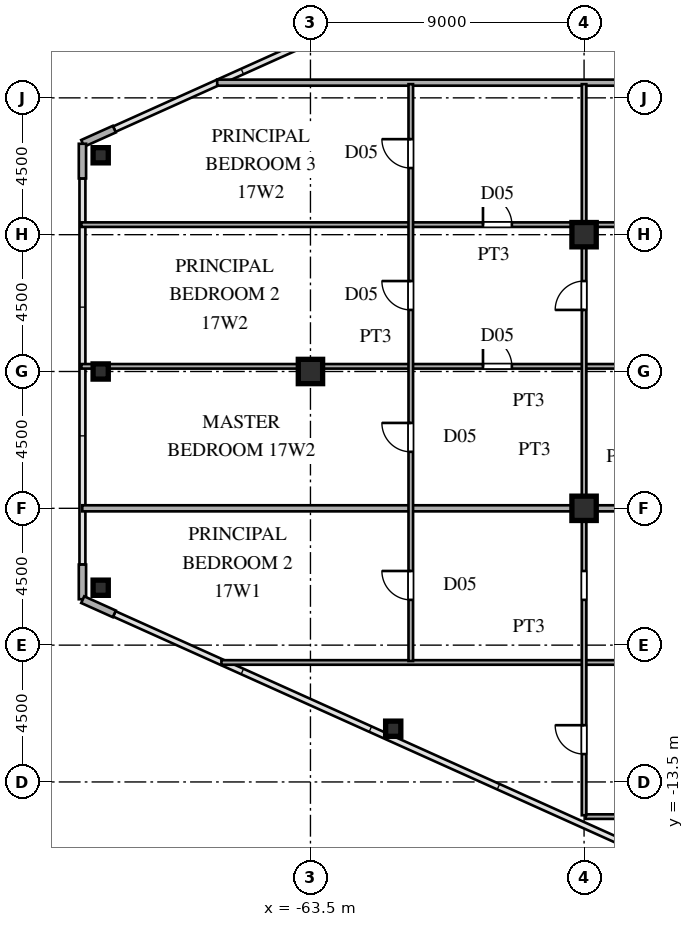
"""IFC4 building model, lengths in metres.
Left out: names, types, materials, properties, quantities, classifications, styles, units other than length and angle.
Written with IfcOpenShell. Run it as: python <this file> out.ifc"""

import sys

from ifc_helpers import new_model, si_unit, direction, frame, frame_2d, origin, origin_2d, place, context, subcontext, project, spatial, rectangle, hollow_rectangle, i_section, extrude, source, transform, mapped, element, fill, save


model = new_model("IFC4")
c1 = context("Model", 3, precision=1e-05, world=origin(), true_north=direction((0.0, 1.0)))
c2 = subcontext(c1, "Body", "Model", "MODEL_VIEW")
j1 = project(units=[si_unit("LENGTHUNIT", "METRE"), si_unit("PLANEANGLEUNIT", "RADIAN")], contexts=[c1])
p1 = place(None, origin())
s1 = spatial("IfcSite", under=j1, at=p1, CompositionType="ELEMENT")
p2 = place(p1, origin())
s2 = spatial("IfcBuilding", under=s1, at=p2, CompositionType="ELEMENT")
p3 = place(p2, frame((0.0, 0.0, 65.7)))
s3 = spatial("IfcBuildingStorey", under=s2, at=p3, CompositionType="ELEMENT", Elevation=65.7)
m1 = source(origin(), c2, "Body", "SweptSolid", [
    extrude(i_section(OverallWidth=0.8, OverallDepth=0.8, WebThickness=0.032, FlangeThickness=0.05, at=origin_2d()), origin(), (0.0, 0.0, 1.0), 3.6),
])
for number, where, z_axis, x_axis in (
    (1, (-54.5, -4.5, 0.0), (0.0, 0.0, 1.0), (1.0, 0.0, 0.0)),
    (2, (-54.5, 4.5, 0.0), (0.0, 0.0, 1.0), (1.0, 0.0, 0.0)),
    (3, (-63.5, 0.0, 0.0), (0.0, 0.0, 1.0), (1.0, 0.0, 0.0)),
):
    element("IfcColumn", number, at=place(p3, frame(where, z_axis=z_axis, x_axis=x_axis)), inside=s3, PredefinedType="COLUMN", context=c2, shape_type="MappedRepresentation", body=[
        mapped(m1, transform((0.0, 0.0, 0.0), scale=1.0)),
    ])
m2 = source(origin(), c2, "Body", "SweptSolid", [
    extrude(hollow_rectangle(XDim=0.5, YDim=0.5, WallThickness=0.02, at=origin_2d()), origin(), (0.0, 0.0, 1.0), 3.6),
])
for number, where, z_axis, x_axis in (
    (4, (-70.4, 7.112, 0.0), (0.0, 0.0, 1.0), (1.0, 0.0, 0.0)),
    (5, (-70.4, -7.112, 0.0), (0.0, 0.0, 1.0), (1.0, 0.0, 0.0)),
    (6, (-60.778, -11.749, 0.0), (0.0, 0.0, 1.0), (1.0, 0.0, 0.0)),
    (7, (-70.4, 0.0, 0.0), (0.0, 0.0, 1.0), (1.0, 0.0, 0.0)),
):
    element("IfcColumn", number, at=place(p3, frame(where, z_axis=z_axis, x_axis=x_axis)), inside=s3, PredefinedType="COLUMN", context=c2, shape_type="MappedRepresentation", body=[
        mapped(m2, transform((0.0, 0.0, 0.0), scale=1.0)),
    ])
for number, where, z_axis, x_axis in (
    (8, (-69.951, 7.972, 0.0), (0.0, 0.0, 1.0), (-0.912, -0.41, 0.0)),
    (9, (-71.0, 7.49, 0.0), (0.0, 0.0, 1.0), (0.0, -1.0, 0.0)),
    (10, (-71.0, -6.35, 0.0), (0.0, 0.0, 1.0), (0.0, -1.0, 0.0)),
    (11, (-70.991, -7.504, 0.0), (0.0, 0.0, 1.0), (0.912, -0.41, 0.0)),
):
    element("IfcWall", number, at=place(p3, frame(where, z_axis=z_axis, x_axis=x_axis)), inside=s3, PredefinedType="SOLIDWALL", context=c2, shape_type="SweptSolid", body=[
        extrude(rectangle(XDim=1.14, YDim=0.24, at=frame_2d((0.57, 0.0))), origin(), (0.0, 0.0, 1.0), 3.38),
    ])
p4 = place(p3, frame((-54.45, -14.64, 0.0), z_axis=(0.0, 0.0, 1.0), x_axis=(1.0, 0.0, 0.0)))
e12 = element("IfcWall", 12, at=p4, inside=s3, PredefinedType="PARTITIONING", context=c2, shape_type="SweptSolid", body=[
    extrude(rectangle(XDim=10.55, YDim=0.15, at=frame_2d((5.275, 0.0))), origin(), (0.0, 0.0, 1.0), 3.38),
])
p5 = place(p4, frame((4.8, 0.0, 0.0)))
e13 = element("IfcOpeningElement", 13, at=p5, cuts=e12, PredefinedType="OPENING", context=c2, shape_type="SweptSolid", body=[
    extrude(rectangle(XDim=0.95, YDim=2.15, at=frame_2d((0.475, 1.075))), frame((0.0, 0.085, 0.0), z_axis=(0.0, -1.0, 0.0), x_axis=(1.0, 0.0, 0.0)), (0.0, 0.0, 1.0), 0.17),
])
p6 = place(p3, frame((-66.429, -9.57, 0.0), z_axis=(0.0, 0.0, 1.0), x_axis=(1.0, 0.0, 0.0)))
e14 = element("IfcWall", 14, at=p6, inside=s3, PredefinedType="PARTITIONING", context=c2, shape_type="SweptSolid", body=[
    extrude(rectangle(XDim=22.529, YDim=0.15, at=frame_2d((11.265, 0.0))), origin(), (0.0, 0.0, 1.0), 3.38),
])
p7 = place(p6, frame((16.779, 0.0, 0.0)))
e15 = element("IfcOpeningElement", 15, at=p7, cuts=e14, PredefinedType="OPENING", context=c2, shape_type="SweptSolid", body=[
    extrude(rectangle(XDim=0.95, YDim=2.15, at=frame_2d((0.475, 1.075))), frame((0.0, 0.085, 0.0), z_axis=(0.0, -1.0, 0.0), x_axis=(1.0, 0.0, 0.0)), (0.0, 0.0, 1.0), 0.17),
])
p8 = place(p3, frame((-71.005, -4.5, 0.0), z_axis=(0.0, 0.0, 1.0), x_axis=(1.0, 0.0, 0.0)))
e16 = element("IfcWall", 16, at=p8, inside=s3, PredefinedType="PARTITIONING", context=c2, shape_type="SweptSolid", body=[
    extrude(rectangle(XDim=16.485, YDim=0.2, at=frame_2d((8.242, 0.0))), origin(), (0.0, 0.0, 1.0), 3.38),
])
p9 = place(p3, frame((-54.52, -4.5, 0.0), z_axis=(0.0, 0.0, 1.0), x_axis=(1.0, 0.0, 0.0)))
e17 = element("IfcWall", 17, at=p9, inside=s3, PredefinedType="PARTITIONING", context=c2, shape_type="SweptSolid", body=[
    extrude(rectangle(XDim=15.69, YDim=0.2, at=frame_2d((7.845, 0.0))), origin(), (0.0, 0.0, 1.0), 2.68),
])
p10 = place(p3, frame((-71.035, 0.17, 0.0), z_axis=(0.0, 0.0, 1.0), x_axis=(1.0, 0.0, 0.0)))
e18 = element("IfcWall", 18, at=p10, inside=s3, PredefinedType="PARTITIONING", context=c2, shape_type="SweptSolid", body=[
    extrude(rectangle(XDim=27.135, YDim=0.15, at=frame_2d((13.567, 0.0))), origin(), (0.0, 0.0, 1.0), 3.38),
])
p11 = place(p10, frame((21.385, 0.0, 0.0)))
e19 = element("IfcOpeningElement", 19, at=p11, cuts=e18, PredefinedType="OPENING", context=c2, shape_type="SweptSolid", body=[
    extrude(rectangle(XDim=0.95, YDim=2.15, at=frame_2d((0.475, 1.075))), frame((0.0, 0.085, 0.0), z_axis=(0.0, -1.0, 0.0), x_axis=(1.0, 0.0, 0.0)), (0.0, 0.0, 1.0), 0.17),
])
p12 = place(p10, frame((13.21, 0.0, 0.0)))
e20 = element("IfcOpeningElement", 20, at=p12, cuts=e18, PredefinedType="OPENING", context=c2, shape_type="SweptSolid", body=[
    extrude(rectangle(XDim=0.95, YDim=2.15, at=frame_2d((0.475, 1.075))), frame((0.0, 0.085, 0.0), z_axis=(0.0, -1.0, 0.0), x_axis=(1.0, 0.0, 0.0)), (0.0, 0.0, 1.0), 0.17),
])
p13 = place(p3, frame((-71.035, 4.83, 0.0), z_axis=(0.0, 0.0, 1.0), x_axis=(1.0, 0.0, 0.0)))
e21 = element("IfcWall", 21, at=p13, inside=s3, PredefinedType="PARTITIONING", context=c2, shape_type="SweptSolid", body=[
    extrude(rectangle(XDim=27.135, YDim=0.15, at=frame_2d((13.567, 0.0))), origin(), (0.0, 0.0, 1.0), 3.38),
])
p14 = place(p13, frame((21.385, 0.0, 0.0)))
e22 = element("IfcOpeningElement", 22, at=p14, cuts=e21, PredefinedType="OPENING", context=c2, shape_type="SweptSolid", body=[
    extrude(rectangle(XDim=0.95, YDim=2.15, at=frame_2d((0.475, 1.075))), frame((0.0, 0.085, 0.0), z_axis=(0.0, -1.0, 0.0), x_axis=(1.0, 0.0, 0.0)), (0.0, 0.0, 1.0), 0.17),
])
p15 = place(p13, frame((13.21, 0.0, 0.0)))
e23 = element("IfcOpeningElement", 23, at=p15, cuts=e21, PredefinedType="OPENING", context=c2, shape_type="SweptSolid", body=[
    extrude(rectangle(XDim=0.95, YDim=2.15, at=frame_2d((0.475, 1.075))), frame((0.0, 0.085, 0.0), z_axis=(0.0, -1.0, 0.0), x_axis=(1.0, 0.0, 0.0)), (0.0, 0.0, 1.0), 0.17),
])
p16 = place(p3, frame((-66.568, 9.5, 0.0), z_axis=(0.0, 0.0, 1.0), x_axis=(1.0, 0.0, 0.0)))
e24 = element("IfcWall", 24, at=p16, inside=s3, PredefinedType="PARTITIONING", context=c2, shape_type="SweptSolid", body=[
    extrude(rectangle(XDim=27.738, YDim=0.2, at=frame_2d((13.869, 0.0))), origin(), (0.0, 0.0, 1.0), 3.38),
])
p17 = place(p3, frame((-60.2, -9.522, 0.0), z_axis=(0.0, 0.0, 1.0), x_axis=(0.0, 1.0, 0.0)))
e25 = element("IfcWall", 25, at=p17, inside=s3, PredefinedType="PARTITIONING", context=c2, shape_type="SweptSolid", body=[
    extrude(rectangle(XDim=18.972, YDim=0.15, at=frame_2d((9.486, 0.0))), origin(), (0.0, 0.0, 1.0), 3.38),
])
p18 = place(p17, frame((2.011, 0.0, 0.0)))
e26 = element("IfcOpeningElement", 26, at=p18, cuts=e25, PredefinedType="OPENING", context=c2, shape_type="SweptSolid", body=[
    extrude(rectangle(XDim=0.95, YDim=2.15, at=frame_2d((0.475, 1.075))), frame((0.0, 0.085, 0.0), z_axis=(0.0, -1.0, 0.0), x_axis=(1.0, 0.0, 0.0)), (0.0, 0.0, 1.0), 0.17),
])
p19 = place(p17, frame((6.88, 0.0, 0.0)))
e27 = element("IfcOpeningElement", 27, at=p19, cuts=e25, PredefinedType="OPENING", context=c2, shape_type="SweptSolid", body=[
    extrude(rectangle(XDim=0.95, YDim=2.15, at=frame_2d((0.475, 1.075))), frame((0.0, 0.085, 0.0), z_axis=(0.0, -1.0, 0.0), x_axis=(1.0, 0.0, 0.0)), (0.0, 0.0, 1.0), 0.17),
])
p20 = place(p17, frame((11.547, 0.0, 0.0)))
e28 = element("IfcOpeningElement", 28, at=p20, cuts=e25, PredefinedType="OPENING", context=c2, shape_type="SweptSolid", body=[
    extrude(rectangle(XDim=0.95, YDim=2.15, at=frame_2d((0.475, 1.075))), frame((0.0, 0.085, 0.0), z_axis=(0.0, -1.0, 0.0), x_axis=(1.0, 0.0, 0.0)), (0.0, 0.0, 1.0), 0.17),
])
p21 = place(p17, frame((16.214, 0.0, 0.0)))
e29 = element("IfcOpeningElement", 29, at=p21, cuts=e25, PredefinedType="OPENING", context=c2, shape_type="SweptSolid", body=[
    extrude(rectangle(XDim=0.95, YDim=2.15, at=frame_2d((0.475, 1.075))), frame((0.0, 0.085, 0.0), z_axis=(0.0, -1.0, 0.0), x_axis=(1.0, 0.0, 0.0)), (0.0, 0.0, 1.0), 0.17),
])
p22 = place(p3, frame((-54.5, -14.595, 0.0), z_axis=(0.0, 0.0, 1.0), x_axis=(0.0, 1.0, 0.0)))
e30 = element("IfcWall", 30, at=p22, inside=s3, PredefinedType="PARTITIONING", context=c2, shape_type="SweptSolid", body=[
    extrude(rectangle(XDim=24.045, YDim=0.15, at=frame_2d((12.022, 0.0))), origin(), (0.0, 0.0, 1.0), 2.68),
])
p23 = place(p22, frame((2.011, 0.0, 0.0)))
e31 = element("IfcOpeningElement", 31, at=p23, cuts=e30, PredefinedType="OPENING", context=c2, shape_type="SweptSolid", body=[
    extrude(rectangle(XDim=0.95, YDim=2.15, at=frame_2d((0.475, 1.075))), frame((0.0, 0.085, 0.0), z_axis=(0.0, -1.0, 0.0), x_axis=(1.0, 0.0, 0.0)), (0.0, 0.0, 1.0), 0.17),
])
p24 = place(p22, frame((7.084, 0.0, 0.0)))
e32 = element("IfcOpeningElement", 32, at=p24, cuts=e30, PredefinedType="OPENING", context=c2, shape_type="SweptSolid", body=[
    extrude(rectangle(XDim=0.95, YDim=2.15, at=frame_2d((0.475, 1.075))), frame((0.0, 0.085, 0.0), z_axis=(0.0, -1.0, 0.0), x_axis=(1.0, 0.0, 0.0)), (0.0, 0.0, 1.0), 0.17),
])
p25 = place(p22, frame((16.62, 0.0, 0.0)))
e33 = element("IfcOpeningElement", 33, at=p25, cuts=e30, PredefinedType="OPENING", context=c2, shape_type="SweptSolid", body=[
    extrude(rectangle(XDim=0.95, YDim=2.15, at=frame_2d((0.475, 1.075))), frame((0.0, 0.085, 0.0), z_axis=(0.0, -1.0, 0.0), x_axis=(1.0, 0.0, 0.0)), (0.0, 0.0, 1.0), 0.17),
])
m3 = source(origin(), c2, "Body", "SweptSolid", [
    extrude(rectangle(XDim=0.95, YDim=2.15, at=frame_2d((0.475, 1.075))), frame((0.0, 0.025, 0.0), z_axis=(0.0, -1.0, 0.0), x_axis=(1.0, 0.0, 0.0)), (0.0, 0.0, 1.0), 0.05),
])
p26 = place(p12, origin())
e34 = element("IfcDoor", 34, at=p26, inside=s3, OperationType="SINGLE_SWING_LEFT", PredefinedType="DOOR", context=c2, shape_type="MappedRepresentation", body=[
    mapped(m3, transform((0.0, 0.0, 0.0), scale=1.0)),
])
fill(e20, e34)
p27 = place(p15, origin())
e35 = element("IfcDoor", 35, at=p27, inside=s3, OperationType="SINGLE_SWING_LEFT", PredefinedType="DOOR", context=c2, shape_type="MappedRepresentation", body=[
    mapped(m3, transform((0.0, 0.0, 0.0), scale=1.0)),
])
fill(e23, e35)
p28 = place(p18, origin())
e36 = element("IfcDoor", 36, at=p28, inside=s3, OperationType="SINGLE_SWING_RIGHT", PredefinedType="DOOR", context=c2, shape_type="MappedRepresentation", body=[
    mapped(m3, transform((0.0, 0.0, 0.0), scale=1.0)),
])
fill(e26, e36)
p29 = place(p19, origin())
e37 = element("IfcDoor", 37, at=p29, inside=s3, OperationType="SINGLE_SWING_RIGHT", PredefinedType="DOOR", context=c2, shape_type="MappedRepresentation", body=[
    mapped(m3, transform((0.0, 0.0, 0.0), scale=1.0)),
])
fill(e27, e37)
p30 = place(p20, origin())
e38 = element("IfcDoor", 38, at=p30, inside=s3, OperationType="SINGLE_SWING_RIGHT", PredefinedType="DOOR", context=c2, shape_type="MappedRepresentation", body=[
    mapped(m3, transform((0.0, 0.0, 0.0), scale=1.0)),
])
fill(e28, e38)
p31 = place(p21, origin())
e39 = element("IfcDoor", 39, at=p31, inside=s3, OperationType="SINGLE_SWING_RIGHT", PredefinedType="DOOR", context=c2, shape_type="MappedRepresentation", body=[
    mapped(m3, transform((0.0, 0.0, 0.0), scale=1.0)),
])
fill(e29, e39)
p32 = place(p23, origin())
e40 = element("IfcDoor", 40, at=p32, inside=s3, OperationType="SINGLE_SWING_RIGHT", PredefinedType="DOOR", context=c2, shape_type="MappedRepresentation", body=[
    mapped(m3, transform((0.0, 0.0, 0.0), scale=1.0)),
])
fill(e31, e40)
p33 = place(p25, origin())
e41 = element("IfcDoor", 41, at=p33, inside=s3, OperationType="SINGLE_SWING_LEFT", PredefinedType="DOOR", context=c2, shape_type="MappedRepresentation", body=[
    mapped(m3, transform((0.0, 0.0, 0.0), scale=1.0)),
])
fill(e33, e41)
save(model, sys.argv[1])
